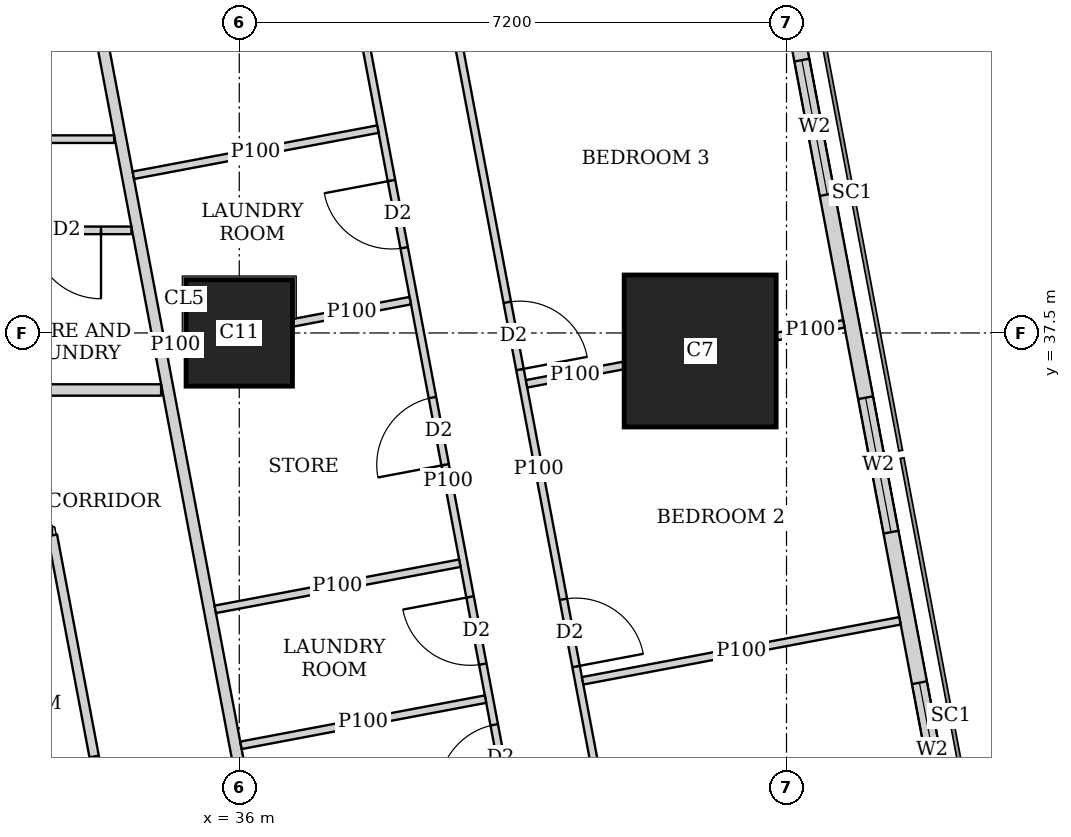
"""IFC4 building model, lengths in metres.
Left out: names, types, materials, properties, quantities, classifications, styles, units other than length and angle.
Written with IfcOpenShell. Run it as: python <this file> out.ifc"""

import sys

from ifc_helpers import new_model, si_unit, direction, frame, frame_2d, origin, origin_2d, place, context, subcontext, project, spatial, rectangle, extrude, element, fill, save


model = new_model("IFC4")
c1 = context("Model", 3, precision=1e-05, world=origin(), true_north=direction((0.0, 1.0)))
c2 = subcontext(c1, "Body", "Model", "MODEL_VIEW")
j1 = project(units=[si_unit("LENGTHUNIT", "METRE"), si_unit("PLANEANGLEUNIT", "RADIAN")], contexts=[c1])
p1 = place(None, origin())
s1 = spatial("IfcSite", under=j1, at=p1, CompositionType="ELEMENT")
p2 = place(p1, origin())
s2 = spatial("IfcBuilding", under=s1, at=p2, CompositionType="ELEMENT")
p3 = place(p2, frame((0.0, 0.0, 262.85)))
s3 = spatial("IfcBuildingStorey", under=s2, at=p3, CompositionType="ELEMENT", Elevation=262.85)
p4 = place(p3, frame((36.0, 37.5, 0.0), z_axis=(0.0, 0.0, 1.0), x_axis=(1.0, 0.0, 0.0)))
e1 = element("IfcColumn", 1, at=p4, inside=s3, PredefinedType="COLUMN", context=c2, shape_type="SweptSolid", body=[
    extrude(rectangle(XDim=1.4, YDim=1.4, at=origin_2d()), origin(), (0.0, 0.0, 1.0), 3.75),
])
p5 = place(p3, frame((42.064, 37.263, 0.0), z_axis=(0.0, 0.0, 1.0), x_axis=(1.0, 0.0, 0.0)))
e2 = element("IfcColumn", 2, at=p5, inside=s3, PredefinedType="COLUMN", context=c2, shape_type="SweptSolid", body=[
    extrude(rectangle(XDim=2.0, YDim=2.0, at=origin_2d()), origin(), (0.0, 0.0, 1.0), 3.75),
])
p6 = place(p3, frame((49.684, 7.832, 0.0), z_axis=(0.0, 0.0, 1.0), x_axis=(-0.185616669694, 0.982622232565, 0.0)))
e3 = element("IfcWall", 3, at=p6, inside=s3, PredefinedType="SOLIDWALL", context=c2, shape_type="SweptSolid", body=[
    extrude(rectangle(XDim=36.0, YDim=0.2, at=frame_2d((18.0, 0.0))), origin(), (0.0, 0.0, 1.0), 3.5),
])
p7 = place(p6, frame((2.518, 0.0, 0.9)))
e4 = element("IfcOpeningElement", 4, at=p7, cuts=e3, PredefinedType="OPENING", context=c2, shape_type="SweptSolid", body=[
    extrude(rectangle(XDim=2.4, YDim=1.5, at=frame_2d((1.2, 0.75))), frame((0.0, 0.11, 0.0), z_axis=(0.0, -1.0, 0.0), x_axis=(1.0, 0.0, 0.0)), (0.0, 0.0, 1.0), 0.22),
])
p8 = place(p6, frame((8.444, 0.0, 0.9)))
e5 = element("IfcOpeningElement", 5, at=p8, cuts=e3, PredefinedType="OPENING", context=c2, shape_type="SweptSolid", body=[
    extrude(rectangle(XDim=1.8, YDim=1.5, at=frame_2d((0.9, 0.75))), frame((0.0, 0.11, 0.0), z_axis=(0.0, -1.0, 0.0), x_axis=(1.0, 0.0, 0.0)), (0.0, 0.0, 1.0), 0.22),
])
p9 = place(p6, frame((12.261, 0.0, 0.9)))
e6 = element("IfcOpeningElement", 6, at=p9, cuts=e3, PredefinedType="OPENING", context=c2, shape_type="SweptSolid", body=[
    extrude(rectangle(XDim=1.8, YDim=1.5, at=frame_2d((0.9, 0.75))), frame((0.0, 0.11, 0.0), z_axis=(0.0, -1.0, 0.0), x_axis=(1.0, 0.0, 0.0)), (0.0, 0.0, 1.0), 0.22),
])
p10 = place(p6, frame((16.078, 0.0, 0.9)))
e7 = element("IfcOpeningElement", 7, at=p10, cuts=e3, PredefinedType="OPENING", context=c2, shape_type="SweptSolid", body=[
    extrude(rectangle(XDim=1.8, YDim=1.5, at=frame_2d((0.9, 0.75))), frame((0.0, 0.11, 0.0), z_axis=(0.0, -1.0, 0.0), x_axis=(1.0, 0.0, 0.0)), (0.0, 0.0, 1.0), 0.22),
])
p11 = place(p6, frame((19.894, 0.0, 0.9)))
e8 = element("IfcOpeningElement", 8, at=p11, cuts=e3, PredefinedType="OPENING", context=c2, shape_type="SweptSolid", body=[
    extrude(rectangle(XDim=1.8, YDim=1.5, at=frame_2d((0.9, 0.75))), frame((0.0, 0.11, 0.0), z_axis=(0.0, -1.0, 0.0), x_axis=(1.0, 0.0, 0.0)), (0.0, 0.0, 1.0), 0.22),
])
p12 = place(p6, frame((23.71, 0.0, 0.9)))
e9 = element("IfcOpeningElement", 9, at=p12, cuts=e3, PredefinedType="OPENING", context=c2, shape_type="SweptSolid", body=[
    extrude(rectangle(XDim=1.8, YDim=1.5, at=frame_2d((0.9, 0.75))), frame((0.0, 0.11, 0.0), z_axis=(0.0, -1.0, 0.0), x_axis=(1.0, 0.0, 0.0)), (0.0, 0.0, 1.0), 0.22),
])
p13 = place(p6, frame((27.526, 0.0, 0.9)))
e10 = element("IfcOpeningElement", 10, at=p13, cuts=e3, PredefinedType="OPENING", context=c2, shape_type="SweptSolid", body=[
    extrude(rectangle(XDim=1.8, YDim=1.5, at=frame_2d((0.9, 0.75))), frame((0.0, 0.11, 0.0), z_axis=(0.0, -1.0, 0.0), x_axis=(1.0, 0.0, 0.0)), (0.0, 0.0, 1.0), 0.22),
])
p14 = place(p6, frame((32.046, 0.0, 0.9)))
e11 = element("IfcOpeningElement", 11, at=p14, cuts=e3, PredefinedType="OPENING", context=c2, shape_type="SweptSolid", body=[
    extrude(rectangle(XDim=1.8, YDim=1.5, at=frame_2d((0.9, 0.75))), frame((0.0, 0.11, 0.0), z_axis=(0.0, -1.0, 0.0), x_axis=(1.0, 0.0, 0.0)), (0.0, 0.0, 1.0), 0.22),
])
p15 = place(p3, frame((29.501, 36.75, 0.0), z_axis=(0.0, 0.0, 1.0), x_axis=(1.0, 0.0, 0.0)))
e12 = element("IfcWall", 12, at=p15, inside=s3, PredefinedType="SOLIDWALL", context=c2, shape_type="SweptSolid", body=[
    extrude(rectangle(XDim=5.471, YDim=0.15, at=frame_2d((2.735, 0.0))), origin(), (0.0, 0.0, 1.0), 3.5),
])
p16 = place(p3, frame((34.036, 42.186, 0.0), z_axis=(0.0, 0.0, 1.0), x_axis=(0.185593518645, -0.9826266055, 0.0)))
e13 = element("IfcWall", 13, at=p16, inside=s3, PredefinedType="SOLIDWALL", context=c2, shape_type="SweptSolid", body=[
    extrude(rectangle(XDim=35.961, YDim=0.15, at=frame_2d((17.98, 0.0))), origin(), (0.0, 0.0, 1.0), 2.5),
])
p17 = place(p16, frame((15.529, 0.0, 0.0)))
e14 = element("IfcOpeningElement", 14, at=p17, cuts=e13, PredefinedType="OPENING", context=c2, shape_type="SweptSolid", body=[
    extrude(rectangle(XDim=1.0, YDim=2.1, at=frame_2d((0.5, 1.05))), frame((0.0, 0.085, 0.0), z_axis=(0.0, -1.0, 0.0), x_axis=(1.0, 0.0, 0.0)), (0.0, 0.0, 1.0), 0.17),
])
p18 = place(p16, frame((19.345, 0.0, 0.0)))
e15 = element("IfcOpeningElement", 15, at=p18, cuts=e13, PredefinedType="OPENING", context=c2, shape_type="SweptSolid", body=[
    extrude(rectangle(XDim=1.0, YDim=2.1, at=frame_2d((0.5, 1.05))), frame((0.0, 0.085, 0.0), z_axis=(0.0, -1.0, 0.0), x_axis=(1.0, 0.0, 0.0)), (0.0, 0.0, 1.0), 0.17),
])
p19 = place(p16, frame((30.594, 0.0, 0.0)))
e16 = element("IfcOpeningElement", 16, at=p19, cuts=e13, PredefinedType="OPENING", context=c2, shape_type="SweptSolid", body=[
    extrude(rectangle(XDim=1.0, YDim=2.1, at=frame_2d((0.5, 1.05))), frame((0.0, 0.085, 0.0), z_axis=(0.0, -1.0, 0.0), x_axis=(1.0, 0.0, 0.0)), (0.0, 0.0, 1.0), 0.17),
])
p20 = place(p3, frame((38.744, 42.045, 0.0), z_axis=(0.0, 0.0, 1.0), x_axis=(0.185614085367, -0.982622720739, 0.0)))
e17 = element("IfcWall", 17, at=p20, inside=s3, PredefinedType="PARTITIONING", context=c2, shape_type="SweptSolid", body=[
    extrude(rectangle(XDim=12.898, YDim=0.1, at=frame_2d((6.449, 0.0))), origin(), (0.0, 0.0, 1.0), 2.5),
])
p21 = place(p20, frame((11.848, 0.0, 0.0)))
e18 = element("IfcOpeningElement", 18, at=p21, cuts=e17, PredefinedType="OPENING", context=c2, shape_type="SweptSolid", body=[
    extrude(rectangle(XDim=0.9, YDim=2.1, at=frame_2d((0.45, 1.05))), frame((0.0, 0.06, 0.0), z_axis=(0.0, -1.0, 0.0), x_axis=(1.0, 0.0, 0.0)), (0.0, 0.0, 1.0), 0.12),
])
p22 = place(p20, frame((8.191, 0.0, 0.0)))
e19 = element("IfcOpeningElement", 19, at=p22, cuts=e17, PredefinedType="OPENING", context=c2, shape_type="SweptSolid", body=[
    extrude(rectangle(XDim=0.9, YDim=2.1, at=frame_2d((0.45, 1.05))), frame((0.0, 0.06, 0.0), z_axis=(0.0, -1.0, 0.0), x_axis=(1.0, 0.0, 0.0)), (0.0, 0.0, 1.0), 0.12),
])
p23 = place(p20, frame((4.215, 0.0, 0.0)))
e20 = element("IfcOpeningElement", 20, at=p23, cuts=e17, PredefinedType="OPENING", context=c2, shape_type="SweptSolid", body=[
    extrude(rectangle(XDim=0.9, YDim=2.1, at=frame_2d((0.45, 1.05))), frame((0.0, 0.06, 0.0), z_axis=(0.0, -1.0, 0.0), x_axis=(1.0, 0.0, 0.0)), (0.0, 0.0, 1.0), 0.12),
])
p24 = place(p3, frame((37.511, 42.109, 0.0), z_axis=(0.0, 0.0, 1.0), x_axis=(0.185550464988, -0.982634736279, 0.0)))
e21 = element("IfcWall", 21, at=p24, inside=s3, PredefinedType="PARTITIONING", context=c2, shape_type="SweptSolid", body=[
    extrude(rectangle(XDim=13.35, YDim=0.1, at=frame_2d((6.675, 0.0))), origin(), (0.0, 0.0, 1.0), 2.5),
])
p25 = place(p24, frame((11.845, 0.0, 0.0)))
e22 = element("IfcOpeningElement", 22, at=p25, cuts=e21, PredefinedType="OPENING", context=c2, shape_type="SweptSolid", body=[
    extrude(rectangle(XDim=0.9, YDim=2.1, at=frame_2d((0.45, 1.05))), frame((0.0, 0.06, 0.0), z_axis=(0.0, -1.0, 0.0), x_axis=(1.0, 0.0, 0.0)), (0.0, 0.0, 1.0), 0.12),
])
p26 = place(p24, frame((8.224, 0.0, 0.0)))
e23 = element("IfcOpeningElement", 23, at=p26, cuts=e21, PredefinedType="OPENING", context=c2, shape_type="SweptSolid", body=[
    extrude(rectangle(XDim=0.9, YDim=2.1, at=frame_2d((0.45, 1.05))), frame((0.0, 0.06, 0.0), z_axis=(0.0, -1.0, 0.0), x_axis=(1.0, 0.0, 0.0)), (0.0, 0.0, 1.0), 0.12),
])
p27 = place(p24, frame((2.65, 0.0, 0.0)))
e24 = element("IfcOpeningElement", 24, at=p27, cuts=e21, PredefinedType="OPENING", context=c2, shape_type="SweptSolid", body=[
    extrude(rectangle(XDim=0.9, YDim=2.1, at=frame_2d((0.45, 1.05))), frame((0.0, 0.06, 0.0), z_axis=(0.0, -1.0, 0.0), x_axis=(1.0, 0.0, 0.0)), (0.0, 0.0, 1.0), 0.12),
])
p28 = place(p24, frame((9.936, 0.0, 0.0)))
e25 = element("IfcOpeningElement", 25, at=p28, cuts=e21, PredefinedType="OPENING", context=c2, shape_type="SweptSolid", body=[
    extrude(rectangle(XDim=0.9, YDim=2.1, at=frame_2d((0.45, 1.05))), frame((0.0, 0.06, 0.0), z_axis=(0.0, -1.0, 0.0), x_axis=(1.0, 0.0, 0.0)), (0.0, 0.0, 1.0), 0.12),
])
p29 = place(p24, frame((5.555, 0.0, 0.0)))
e26 = element("IfcOpeningElement", 26, at=p29, cuts=e21, PredefinedType="OPENING", context=c2, shape_type="SweptSolid", body=[
    extrude(rectangle(XDim=0.9, YDim=2.1, at=frame_2d((0.45, 1.05))), frame((0.0, 0.06, 0.0), z_axis=(0.0, -1.0, 0.0), x_axis=(1.0, 0.0, 0.0)), (0.0, 0.0, 1.0), 0.12),
])
p30 = place(p3, frame((43.955, 37.62, 0.0), z_axis=(0.0, 0.0, 1.0), x_axis=(-0.982708424405, -0.18515980288, 0.0)))
e27 = element("IfcWall", 27, at=p30, inside=s3, PredefinedType="PARTITIONING", context=c2, shape_type="SweptSolid", body=[
    extrude(rectangle(XDim=0.897, YDim=0.1, at=frame_2d((0.448, 0.0))), origin(), (0.0, 0.0, 1.0), 3.5),
])
p31 = place(p3, frame((41.054, 37.072, 0.0), z_axis=(0.0, 0.0, 1.0), x_axis=(-0.982576752117, -0.185857273733, 0.0)))
e28 = element("IfcWall", 28, at=p31, inside=s3, PredefinedType="PARTITIONING", context=c2, shape_type="SweptSolid", body=[
    extrude(rectangle(XDim=1.297, YDim=0.1, at=frame_2d((0.648, 0.0))), origin(), (0.0, 0.0, 1.0), 3.5),
])
p32 = place(p3, frame((44.693, 33.713, 0.0), z_axis=(0.0, 0.0, 1.0), x_axis=(-0.982615600536, -0.185651775062, 0.0)))
e29 = element("IfcWall", 29, at=p32, inside=s3, PredefinedType="PARTITIONING", context=c2, shape_type="SweptSolid", body=[
    extrude(rectangle(XDim=4.249, YDim=0.1, at=frame_2d((2.125, 0.0))), origin(), (0.0, 0.0, 1.0), 2.5),
])
p33 = place(p3, frame((37.824, 40.182, 0.0), z_axis=(0.0, 0.0, 1.0), x_axis=(-0.982674977865, -0.185337227447, 0.0)))
e30 = element("IfcWall", 30, at=p33, inside=s3, PredefinedType="PARTITIONING", context=c2, shape_type="SweptSolid", body=[
    extrude(rectangle(XDim=3.275, YDim=0.1, at=frame_2d((1.637, 0.0))), origin(), (0.0, 0.0, 1.0), 3.5),
])
p34 = place(p3, frame((38.25, 37.925, 0.0), z_axis=(0.0, 0.0, 1.0), x_axis=(-0.982610209589, -0.185680305934, 0.0)))
e31 = element("IfcWall", 31, at=p34, inside=s3, PredefinedType="PARTITIONING", context=c2, shape_type="SweptSolid", body=[
    extrude(rectangle(XDim=1.567, YDim=0.1, at=frame_2d((0.784, 0.0))), origin(), (0.0, 0.0, 1.0), 3.5),
])
p35 = place(p3, frame((35.29, 37.366, 0.0), z_axis=(0.0, 0.0, 1.0), x_axis=(-0.982395465615, -0.18681313963, 0.0)))
e32 = element("IfcWall", 32, at=p35, inside=s3, PredefinedType="PARTITIONING", context=c2, shape_type="SweptSolid", body=[
    extrude(rectangle(XDim=0.263, YDim=0.1, at=frame_2d((0.131, 0.0))), origin(), (0.0, 0.0, 1.0), 3.5),
])
p36 = place(p3, frame((39.24, 32.683, 0.0), z_axis=(0.0, 0.0, 1.0), x_axis=(-0.982607026909, -0.185697147715, 0.0)))
e33 = element("IfcWall", 33, at=p36, inside=s3, PredefinedType="PARTITIONING", context=c2, shape_type="SweptSolid", body=[
    extrude(rectangle(XDim=3.275, YDim=0.1, at=frame_2d((1.637, 0.0))), origin(), (0.0, 0.0, 1.0), 3.5),
])
p37 = place(p3, frame((38.902, 34.471, 0.0), z_axis=(0.0, 0.0, 1.0), x_axis=(-0.982674977865, -0.185337227447, 0.0)))
e34 = element("IfcWall", 34, at=p37, inside=s3, PredefinedType="PARTITIONING", context=c2, shape_type="SweptSolid", body=[
    extrude(rectangle(XDim=3.275, YDim=0.1, at=frame_2d((1.637, 0.0))), origin(), (0.0, 0.0, 1.0), 3.5),
])
p38 = place(p3, frame((21.6, 40.05, 0.0), z_axis=(0.0, 0.0, 1.0), x_axis=(1.0, 0.0, 0.0)))
e35 = element("IfcWall", 35, at=p38, inside=s3, PredefinedType="PARTITIONING", context=c2, shape_type="SweptSolid", body=[
    extrude(rectangle(XDim=12.754, YDim=0.1, at=frame_2d((6.377, 0.0))), origin(), (0.0, 0.0, 1.0), 3.5),
])
p39 = place(p38, frame((0.2, 0.0, 0.0)))
e36 = element("IfcOpeningElement", 36, at=p39, cuts=e35, PredefinedType="OPENING", context=c2, shape_type="SweptSolid", body=[
    extrude(rectangle(XDim=0.9, YDim=2.1, at=frame_2d((0.45, 1.05))), frame((0.0, 0.06, 0.0), z_axis=(0.0, -1.0, 0.0), x_axis=(1.0, 0.0, 0.0)), (0.0, 0.0, 1.0), 0.12),
])
p40 = place(p38, frame((3.8, 0.0, 0.0)))
e37 = element("IfcOpeningElement", 37, at=p40, cuts=e35, PredefinedType="OPENING", context=c2, shape_type="SweptSolid", body=[
    extrude(rectangle(XDim=0.9, YDim=2.1, at=frame_2d((0.45, 1.05))), frame((0.0, 0.06, 0.0), z_axis=(0.0, -1.0, 0.0), x_axis=(1.0, 0.0, 0.0)), (0.0, 0.0, 1.0), 0.12),
])
p41 = place(p38, frame((7.4, 0.0, 0.0)))
e38 = element("IfcOpeningElement", 38, at=p41, cuts=e35, PredefinedType="OPENING", context=c2, shape_type="SweptSolid", body=[
    extrude(rectangle(XDim=0.9, YDim=2.1, at=frame_2d((0.45, 1.05))), frame((0.0, 0.06, 0.0), z_axis=(0.0, -1.0, 0.0), x_axis=(1.0, 0.0, 0.0)), (0.0, 0.0, 1.0), 0.12),
])
p42 = place(p3, frame((21.6, 38.85, 0.0), z_axis=(0.0, 0.0, 1.0), x_axis=(1.0, 0.0, 0.0)))
e39 = element("IfcWall", 39, at=p42, inside=s3, PredefinedType="PARTITIONING", context=c2, shape_type="SweptSolid", body=[
    extrude(rectangle(XDim=12.981, YDim=0.1, at=frame_2d((6.49, 0.0))), origin(), (0.0, 0.0, 1.0), 3.5),
])
p43 = place(p42, frame((1.35, 0.0, 0.0)))
e40 = element("IfcOpeningElement", 40, at=p43, cuts=e39, PredefinedType="OPENING", context=c2, shape_type="SweptSolid", body=[
    extrude(rectangle(XDim=0.9, YDim=2.1, at=frame_2d((0.45, 1.05))), frame((0.0, 0.06, 0.0), z_axis=(0.0, -1.0, 0.0), x_axis=(1.0, 0.0, 0.0)), (0.0, 0.0, 1.0), 0.12),
])
p44 = place(p42, frame((5.55, 0.0, 0.0)))
e41 = element("IfcOpeningElement", 41, at=p44, cuts=e39, PredefinedType="OPENING", context=c2, shape_type="SweptSolid", body=[
    extrude(rectangle(XDim=0.9, YDim=2.1, at=frame_2d((0.45, 1.05))), frame((0.0, 0.06, 0.0), z_axis=(0.0, -1.0, 0.0), x_axis=(1.0, 0.0, 0.0)), (0.0, 0.0, 1.0), 0.12),
])
p45 = place(p42, frame((8.55, 0.0, 0.0)))
e42 = element("IfcOpeningElement", 42, at=p45, cuts=e39, PredefinedType="OPENING", context=c2, shape_type="SweptSolid", body=[
    extrude(rectangle(XDim=0.9, YDim=2.1, at=frame_2d((0.45, 1.05))), frame((0.0, 0.06, 0.0), z_axis=(0.0, -1.0, 0.0), x_axis=(1.0, 0.0, 0.0)), (0.0, 0.0, 1.0), 0.12),
])
p46 = place(p42, frame((11.681, 0.0, 0.0)))
e43 = element("IfcOpeningElement", 43, at=p46, cuts=e39, PredefinedType="OPENING", context=c2, shape_type="SweptSolid", body=[
    extrude(rectangle(XDim=0.9, YDim=2.1, at=frame_2d((0.45, 1.05))), frame((0.0, 0.06, 0.0), z_axis=(0.0, -1.0, 0.0), x_axis=(1.0, 0.0, 0.0)), (0.0, 0.0, 1.0), 0.12),
])
p47 = place(p3, frame((28.95, 34.9, 0.0), z_axis=(0.0, 0.0, 1.0), x_axis=(1.0, 0.0, 0.0)))
e44 = element("IfcWall", 44, at=p47, inside=s3, PredefinedType="PARTITIONING", context=c2, shape_type="SweptSolid", body=[
    extrude(rectangle(XDim=4.588, YDim=0.125, at=frame_2d((2.294, 0.0))), origin(), (0.0, 0.0, 1.0), 3.5),
])
p48 = place(p3, frame((38.202, 10.163, 0.0), z_axis=(0.0, 0.0, 1.0), x_axis=(-0.185610321132, 0.982623431783, 0.0)))
e45 = element("IfcWall", 45, at=p48, inside=s3, PredefinedType="PARTITIONING", context=c2, shape_type="SweptSolid", body=[
    extrude(rectangle(XDim=25.111, YDim=0.125, at=frame_2d((12.556, 0.0))), origin(), (0.0, 0.0, 1.0), 2.5),
])
p49 = place(p48, frame((0.708, 0.0, 0.0)))
e46 = element("IfcOpeningElement", 46, at=p49, cuts=e45, PredefinedType="OPENING", context=c2, shape_type="SweptSolid", body=[
    extrude(rectangle(XDim=1.0, YDim=2.1, at=frame_2d((0.5, 1.05))), frame((0.0, 0.073, 0.0), z_axis=(0.0, -1.0, 0.0), x_axis=(1.0, 0.0, 0.0)), (0.0, 0.0, 1.0), 0.145),
])
p50 = place(p48, frame((5.9, 0.0, 0.0)))
e47 = element("IfcOpeningElement", 47, at=p50, cuts=e45, PredefinedType="OPENING", context=c2, shape_type="SweptSolid", body=[
    extrude(rectangle(XDim=1.0, YDim=2.1, at=frame_2d((0.5, 1.05))), frame((0.0, 0.073, 0.0), z_axis=(0.0, -1.0, 0.0), x_axis=(1.0, 0.0, 0.0)), (0.0, 0.0, 1.0), 0.145),
])
p51 = place(p48, frame((13.378, 0.0, 0.0)))
e48 = element("IfcOpeningElement", 48, at=p51, cuts=e45, PredefinedType="OPENING", context=c2, shape_type="SweptSolid", body=[
    extrude(rectangle(XDim=1.0, YDim=2.1, at=frame_2d((0.5, 1.05))), frame((0.0, 0.073, 0.0), z_axis=(0.0, -1.0, 0.0), x_axis=(1.0, 0.0, 0.0)), (0.0, 0.0, 1.0), 0.145),
])
p52 = place(p48, frame((17.194, 0.0, 0.0)))
e49 = element("IfcOpeningElement", 49, at=p52, cuts=e45, PredefinedType="OPENING", context=c2, shape_type="SweptSolid", body=[
    extrude(rectangle(XDim=1.0, YDim=2.1, at=frame_2d((0.5, 1.05))), frame((0.0, 0.073, 0.0), z_axis=(0.0, -1.0, 0.0), x_axis=(1.0, 0.0, 0.0)), (0.0, 0.0, 1.0), 0.145),
])
p53 = place(p48, frame((21.15, 0.0, 0.0)))
e50 = element("IfcOpeningElement", 50, at=p53, cuts=e45, PredefinedType="OPENING", context=c2, shape_type="SweptSolid", body=[
    extrude(rectangle(XDim=1.0, YDim=2.1, at=frame_2d((0.5, 1.05))), frame((0.0, 0.073, 0.0), z_axis=(0.0, -1.0, 0.0), x_axis=(1.0, 0.0, 0.0)), (0.0, 0.0, 1.0), 0.145),
])
p54 = place(p12, origin())
e51 = element("IfcWindow", 51, at=p54, inside=s3, PartitioningType="SINGLE_PANEL", PredefinedType="WINDOW", context=c2, shape_type="SweptSolid", body=[
    extrude(rectangle(XDim=1.8, YDim=1.5, at=frame_2d((0.9, 0.75))), frame((0.0, 0.03, 0.0), z_axis=(0.0, -1.0, 0.0), x_axis=(1.0, 0.0, 0.0)), (0.0, 0.0, 1.0), 0.06),
])
fill(e9, e51)
p55 = place(p13, origin())
e52 = element("IfcWindow", 52, at=p55, inside=s3, PartitioningType="SINGLE_PANEL", PredefinedType="WINDOW", context=c2, shape_type="SweptSolid", body=[
    extrude(rectangle(XDim=1.8, YDim=1.5, at=frame_2d((0.9, 0.75))), frame((0.0, 0.03, 0.0), z_axis=(0.0, -1.0, 0.0), x_axis=(1.0, 0.0, 0.0)), (0.0, 0.0, 1.0), 0.06),
])
fill(e10, e52)
p56 = place(p14, origin())
e53 = element("IfcWindow", 53, at=p56, inside=s3, PartitioningType="SINGLE_PANEL", PredefinedType="WINDOW", context=c2, shape_type="SweptSolid", body=[
    extrude(rectangle(XDim=1.8, YDim=1.5, at=frame_2d((0.9, 0.75))), frame((0.0, 0.03, 0.0), z_axis=(0.0, -1.0, 0.0), x_axis=(1.0, 0.0, 0.0)), (0.0, 0.0, 1.0), 0.06),
])
fill(e11, e53)
p57 = place(p22, origin())
e54 = element("IfcDoor", 54, at=p57, inside=s3, OperationType="SINGLE_SWING_RIGHT", PredefinedType="DOOR", context=c2, shape_type="SweptSolid", body=[
    extrude(rectangle(XDim=0.9, YDim=2.1, at=frame_2d((0.45, 1.05))), frame((0.0, 0.025, 0.0), z_axis=(0.0, -1.0, 0.0), x_axis=(1.0, 0.0, 0.0)), (0.0, 0.0, 1.0), 0.05),
])
fill(e19, e54)
p58 = place(p23, origin())
e55 = element("IfcDoor", 55, at=p58, inside=s3, OperationType="SINGLE_SWING_RIGHT", PredefinedType="DOOR", context=c2, shape_type="SweptSolid", body=[
    extrude(rectangle(XDim=0.9, YDim=2.1, at=frame_2d((0.45, 1.05))), frame((0.0, 0.025, 0.0), z_axis=(0.0, -1.0, 0.0), x_axis=(1.0, 0.0, 0.0)), (0.0, 0.0, 1.0), 0.05),
])
fill(e20, e55)
p59 = place(p26, origin())
e56 = element("IfcDoor", 56, at=p59, inside=s3, OperationType="SINGLE_SWING_RIGHT", PredefinedType="DOOR", context=c2, shape_type="SweptSolid", body=[
    extrude(rectangle(XDim=0.9, YDim=2.1, at=frame_2d((0.45, 1.05))), frame((0.0, 0.025, 0.0), z_axis=(0.0, -1.0, 0.0), x_axis=(1.0, 0.0, 0.0)), (0.0, 0.0, 1.0), 0.05),
])
fill(e23, e56)
p60 = place(p27, origin())
e57 = element("IfcDoor", 57, at=p60, inside=s3, OperationType="SINGLE_SWING_RIGHT", PredefinedType="DOOR", context=c2, shape_type="SweptSolid", body=[
    extrude(rectangle(XDim=0.9, YDim=2.1, at=frame_2d((0.45, 1.05))), frame((0.0, 0.025, 0.0), z_axis=(0.0, -1.0, 0.0), x_axis=(1.0, 0.0, 0.0)), (0.0, 0.0, 1.0), 0.05),
])
fill(e24, e57)
p61 = place(p28, origin())
e58 = element("IfcDoor", 58, at=p61, inside=s3, OperationType="SINGLE_SWING_LEFT", PredefinedType="DOOR", context=c2, shape_type="SweptSolid", body=[
    extrude(rectangle(XDim=0.9, YDim=2.1, at=frame_2d((0.45, 1.05))), frame((0.0, 0.025, 0.0), z_axis=(0.0, -1.0, 0.0), x_axis=(1.0, 0.0, 0.0)), (0.0, 0.0, 1.0), 0.05),
])
fill(e25, e58)
p62 = place(p29, origin())
e59 = element("IfcDoor", 59, at=p62, inside=s3, OperationType="SINGLE_SWING_LEFT", PredefinedType="DOOR", context=c2, shape_type="SweptSolid", body=[
    extrude(rectangle(XDim=0.9, YDim=2.1, at=frame_2d((0.45, 1.05))), frame((0.0, 0.025, 0.0), z_axis=(0.0, -1.0, 0.0), x_axis=(1.0, 0.0, 0.0)), (0.0, 0.0, 1.0), 0.05),
])
fill(e26, e59)
p63 = place(p46, origin())
e60 = element("IfcDoor", 60, at=p63, inside=s3, OperationType="SINGLE_SWING_LEFT", PredefinedType="DOOR", context=c2, shape_type="SweptSolid", body=[
    extrude(rectangle(XDim=0.9, YDim=2.1, at=frame_2d((0.45, 1.05))), frame((0.0, 0.025, 0.0), z_axis=(0.0, -1.0, 0.0), x_axis=(1.0, 0.0, 0.0)), (0.0, 0.0, 1.0), 0.05),
])
fill(e43, e60)
p64 = place(p53, origin())
e61 = element("IfcDoor", 61, at=p64, inside=s3, OperationType="SINGLE_SWING_LEFT", PredefinedType="DOOR", context=c2, shape_type="SweptSolid", body=[
    extrude(rectangle(XDim=1.0, YDim=2.1, at=frame_2d((0.5, 1.05))), frame((0.0, 0.025, 0.0), z_axis=(0.0, -1.0, 0.0), x_axis=(1.0, 0.0, 0.0)), (0.0, 0.0, 1.0), 0.05),
])
fill(e50, e61)
save(model, sys.argv[1])
